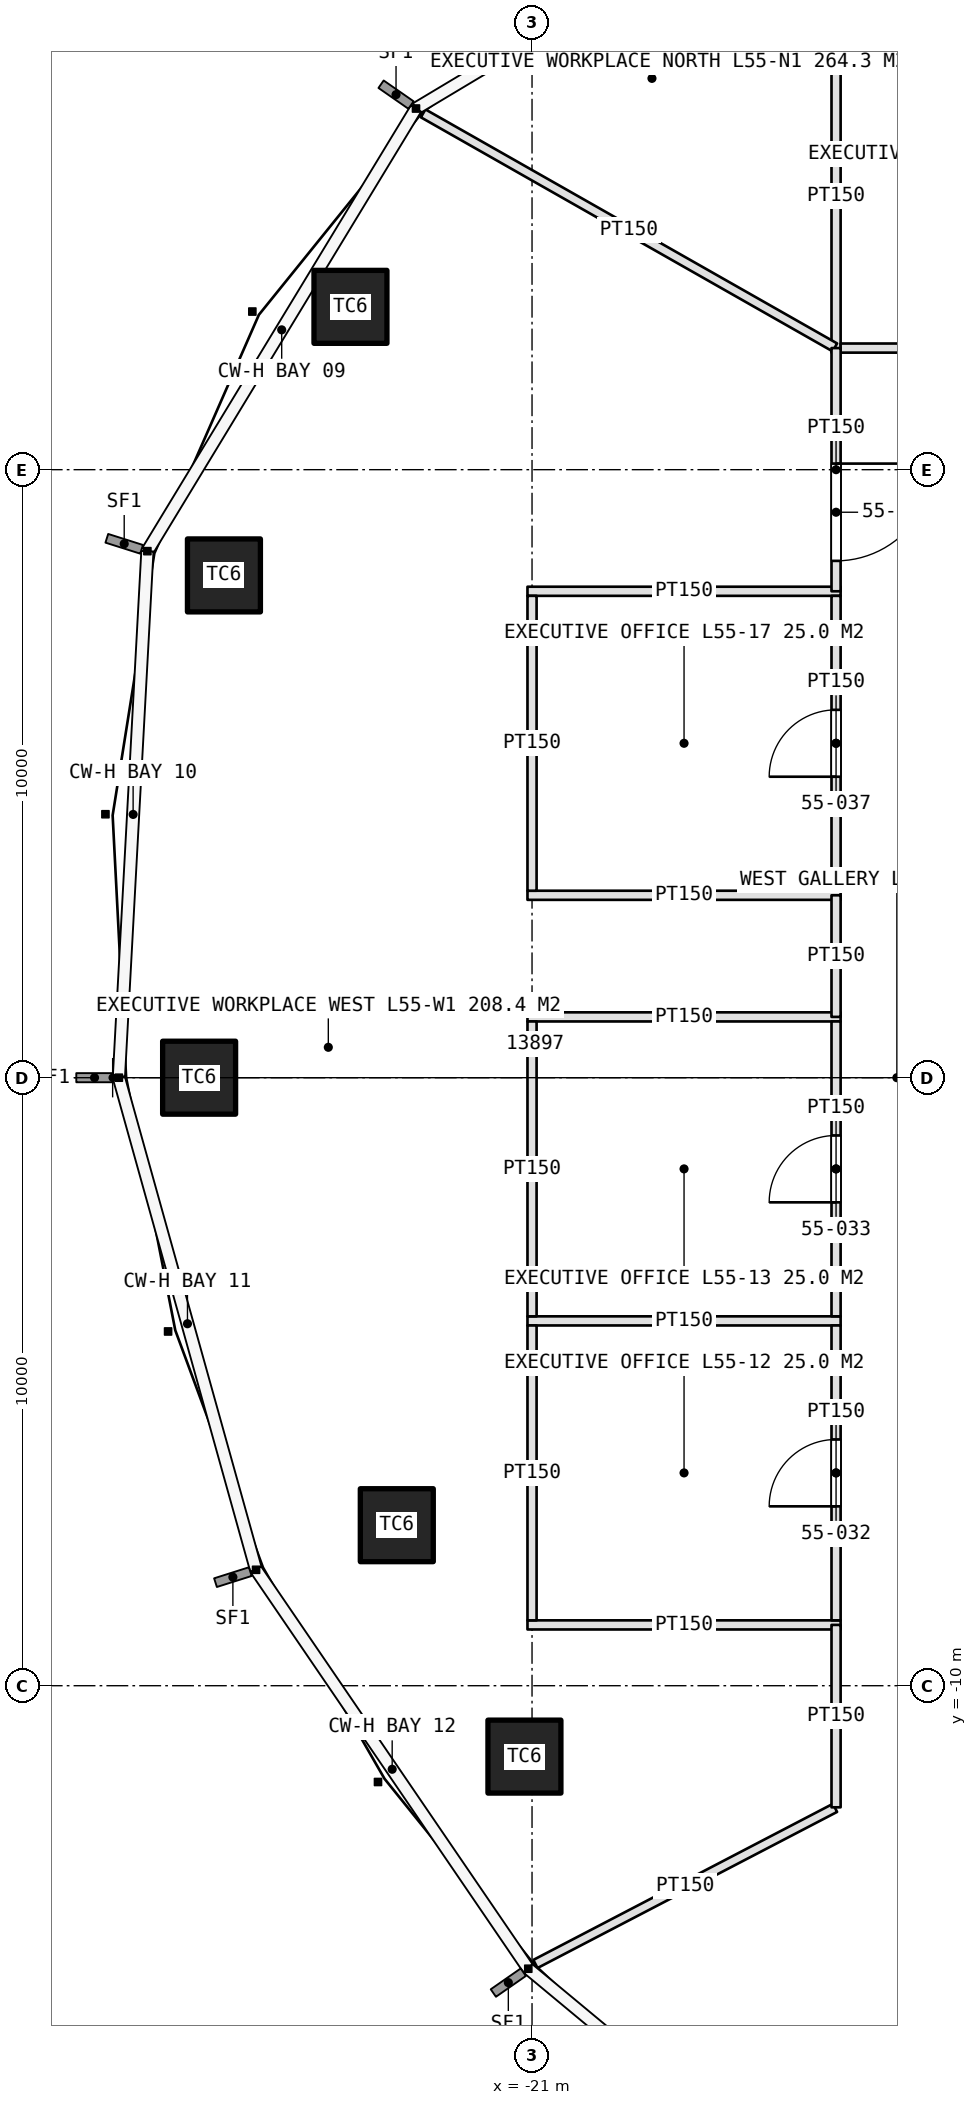
"""IFC4 building model, lengths in metres.
Left out: names, types, materials, properties, quantities, classifications, styles, units other than length and angle.
Written with IfcOpenShell. Run it as: python <this file> out.ifc"""

import sys

from ifc_helpers import new_model, si_unit, direction, frame, frame_2d, origin, origin_2d, place, context, subcontext, project, spatial, rectangle, extrude, element, fill, save


model = new_model("IFC4")
c1 = context("Model", 3, precision=1e-05, world=origin(), true_north=direction((0.0, 1.0)))
c2 = subcontext(c1, "Body", "Model", "MODEL_VIEW")
j1 = project(units=[si_unit("LENGTHUNIT", "METRE"), si_unit("PLANEANGLEUNIT", "RADIAN")], contexts=[c1])
p1 = place(None, origin())
s1 = spatial("IfcSite", under=j1, at=p1, CompositionType="ELEMENT")
p2 = place(p1, origin())
s2 = spatial("IfcBuilding", under=s1, at=p2, CompositionType="ELEMENT")
p3 = place(p2, frame((0.0, 0.0, 249.4)))
s3 = spatial("IfcBuildingStorey", under=s2, at=p3, CompositionType="ELEMENT", Elevation=249.4)
for number, where, z_axis, x_axis in (
    (1, (-23.986, 12.678, 0.0), (0.0, 0.0, 1.0), (1.0, 0.0, 0.0)),
    (2, (-26.067, 8.261, 0.0), (0.0, 0.0, 1.0), (1.0, 0.0, 0.0)),
    (3, (-26.475, 0.0, 0.0), (0.0, 0.0, 1.0), (1.0, 0.0, 0.0)),
    (4, (-23.224, -7.36, 0.0), (0.0, 0.0, 1.0), (1.0, 0.0, 0.0)),
    (5, (-21.125, -11.166, 0.0), (0.0, 0.0, 1.0), (1.0, 0.0, 0.0)),
):
    element("IfcColumn", number, at=place(p3, frame(where, z_axis=z_axis, x_axis=x_axis)), inside=s3, PredefinedType="COLUMN", context=c2, shape_type="SweptSolid", body=[
        extrude(rectangle(XDim=1.2, YDim=1.2, at=origin_2d()), origin(), (0.0, 0.0, 1.0), 4.2),
    ])
p4 = place(p3, frame((-16.0, 11.925, 0.0), z_axis=(0.0, 0.0, 1.0), x_axis=(0.0, 1.0, 0.0)))
e6 = element("IfcWall", 6, at=p4, inside=s3, PredefinedType="PARTITIONING", context=c2, shape_type="SweptSolid", body=[
    extrude(rectangle(XDim=5.15, YDim=0.15, at=frame_2d((2.575, 0.0))), origin(), (0.0, 0.0, 1.0), 3.0),
])
p5 = place(p3, frame((-15.925, 12.0, 0.0), z_axis=(0.0, 0.0, 1.0), x_axis=(1.0, 0.0, 0.0)))
e7 = element("IfcWall", 7, at=p5, inside=s3, PredefinedType="PARTITIONING", context=c2, shape_type="SweptSolid", body=[
    extrude(rectangle(XDim=4.85, YDim=0.15, at=frame_2d((2.425, 0.0))), origin(), (0.0, 0.0, 1.0), 3.0),
])
p6 = place(p5, frame((1.875, 0.0, 0.0)))
e8 = element("IfcOpeningElement", 8, at=p6, cuts=e7, PredefinedType="OPENING", context=c2, shape_type="SweptSolid", body=[
    extrude(rectangle(XDim=1.1, YDim=2.3, at=frame_2d((0.55, 1.15))), frame((0.0, 0.085, 0.0), z_axis=(0.0, -1.0, 0.0), x_axis=(1.0, 0.0, 0.0)), (0.0, 0.0, 1.0), 0.17),
])
for number, where, z_axis, x_axis in (
    (9, (-15.925, -9.0, 0.0), (0.0, 0.0, 1.0), (-1.0, 0.0, 0.0)),
    (10, (-15.925, -4.0, 0.0), (0.0, 0.0, 1.0), (-1.0, 0.0, 0.0)),
    (11, (-15.925, 1.0, 0.0), (0.0, 0.0, 1.0), (-1.0, 0.0, 0.0)),
):
    element("IfcWall", number, at=place(p3, frame(where, z_axis=z_axis, x_axis=x_axis)), inside=s3, PredefinedType="PARTITIONING", context=c2, shape_type="SweptSolid", body=[
        extrude(rectangle(XDim=5.15, YDim=0.15, at=frame_2d((2.575, 0.0))), origin(), (0.0, 0.0, 1.0), 3.0),
    ])
p7 = place(p3, frame((-16.0, -8.925, 0.0), z_axis=(0.0, 0.0, 1.0), x_axis=(0.0, 1.0, 0.0)))
e12 = element("IfcWall", 12, at=p7, inside=s3, PredefinedType="PARTITIONING", context=c2, shape_type="SweptSolid", body=[
    extrude(rectangle(XDim=4.85, YDim=0.15, at=frame_2d((2.425, 0.0))), origin(), (0.0, 0.0, 1.0), 3.0),
])
p8 = place(p7, frame((1.875, 0.0, 0.0)))
e13 = element("IfcOpeningElement", 13, at=p8, cuts=e12, PredefinedType="OPENING", context=c2, shape_type="SweptSolid", body=[
    extrude(rectangle(XDim=1.1, YDim=2.3, at=frame_2d((0.55, 1.15))), frame((0.0, 0.085, 0.0), z_axis=(0.0, -1.0, 0.0), x_axis=(1.0, 0.0, 0.0)), (0.0, 0.0, 1.0), 0.17),
])
p9 = place(p3, frame((-21.0, -8.925, 0.0), z_axis=(0.0, 0.0, 1.0), x_axis=(0.0, 1.0, 0.0)))
e14 = element("IfcWall", 14, at=p9, inside=s3, PredefinedType="PARTITIONING", context=c2, shape_type="SweptSolid", body=[
    extrude(rectangle(XDim=4.85, YDim=0.15, at=frame_2d((2.425, 0.0))), origin(), (0.0, 0.0, 1.0), 3.0),
])
p10 = place(p3, frame((-16.0, -3.925, 0.0), z_axis=(0.0, 0.0, 1.0), x_axis=(0.0, 1.0, 0.0)))
e15 = element("IfcWall", 15, at=p10, inside=s3, PredefinedType="PARTITIONING", context=c2, shape_type="SweptSolid", body=[
    extrude(rectangle(XDim=4.85, YDim=0.15, at=frame_2d((2.425, 0.0))), origin(), (0.0, 0.0, 1.0), 3.0),
])
p11 = place(p10, frame((1.875, 0.0, 0.0)))
e16 = element("IfcOpeningElement", 16, at=p11, cuts=e15, PredefinedType="OPENING", context=c2, shape_type="SweptSolid", body=[
    extrude(rectangle(XDim=1.1, YDim=2.3, at=frame_2d((0.55, 1.15))), frame((0.0, 0.085, 0.0), z_axis=(0.0, -1.0, 0.0), x_axis=(1.0, 0.0, 0.0)), (0.0, 0.0, 1.0), 0.17),
])
p12 = place(p3, frame((-21.0, -3.925, 0.0), z_axis=(0.0, 0.0, 1.0), x_axis=(0.0, 1.0, 0.0)))
e17 = element("IfcWall", 17, at=p12, inside=s3, PredefinedType="PARTITIONING", context=c2, shape_type="SweptSolid", body=[
    extrude(rectangle(XDim=4.85, YDim=0.15, at=frame_2d((2.425, 0.0))), origin(), (0.0, 0.0, 1.0), 3.0),
])
for number, where, z_axis, x_axis in (
    (18, (-15.925, 3.0, 0.0), (0.0, 0.0, 1.0), (-1.0, 0.0, 0.0)),
    (19, (-15.925, 8.0, 0.0), (0.0, 0.0, 1.0), (-1.0, 0.0, 0.0)),
):
    element("IfcWall", number, at=place(p3, frame(where, z_axis=z_axis, x_axis=x_axis)), inside=s3, PredefinedType="PARTITIONING", context=c2, shape_type="SweptSolid", body=[
        extrude(rectangle(XDim=5.15, YDim=0.15, at=frame_2d((2.575, 0.0))), origin(), (0.0, 0.0, 1.0), 3.0),
    ])
p13 = place(p3, frame((-16.0, 3.075, 0.0), z_axis=(0.0, 0.0, 1.0), x_axis=(0.0, 1.0, 0.0)))
e20 = element("IfcWall", 20, at=p13, inside=s3, PredefinedType="PARTITIONING", context=c2, shape_type="SweptSolid", body=[
    extrude(rectangle(XDim=4.85, YDim=0.15, at=frame_2d((2.425, 0.0))), origin(), (0.0, 0.0, 1.0), 3.0),
])
p14 = place(p13, frame((1.875, 0.0, 0.0)))
e21 = element("IfcOpeningElement", 21, at=p14, cuts=e20, PredefinedType="OPENING", context=c2, shape_type="SweptSolid", body=[
    extrude(rectangle(XDim=1.1, YDim=2.3, at=frame_2d((0.55, 1.15))), frame((0.0, 0.085, 0.0), z_axis=(0.0, -1.0, 0.0), x_axis=(1.0, 0.0, 0.0)), (0.0, 0.0, 1.0), 0.17),
])
p15 = place(p3, frame((-21.0, 3.075, 0.0), z_axis=(0.0, 0.0, 1.0), x_axis=(0.0, 1.0, 0.0)))
e22 = element("IfcWall", 22, at=p15, inside=s3, PredefinedType="PARTITIONING", context=c2, shape_type="SweptSolid", body=[
    extrude(rectangle(XDim=4.85, YDim=0.15, at=frame_2d((2.425, 0.0))), origin(), (0.0, 0.0, 1.0), 3.0),
])
p16 = place(p3, frame((-16.018, -12.009, 0.0), z_axis=(0.0, 0.0, 1.0), x_axis=(-0.886831549241, -0.462092851351, 0.0)))
e23 = element("IfcWall", 23, at=p16, inside=s3, PredefinedType="PARTITIONING", context=c2, shape_type="SweptSolid", body=[
    extrude(rectangle(XDim=5.555, YDim=0.15, at=frame_2d((2.778, 0.0))), origin(), (0.0, 0.0, 1.0), 3.0),
])
p17 = place(p3, frame((-16.02, 12.011, 0.0), z_axis=(0.0, 0.0, 1.0), x_axis=(-0.869354026591, 0.494189818238, 0.0)))
e24 = element("IfcWall", 24, at=p17, inside=s3, PredefinedType="PARTITIONING", context=c2, shape_type="SweptSolid", body=[
    extrude(rectangle(XDim=7.788, YDim=0.15, at=frame_2d((3.894, 0.0))), origin(), (0.0, 0.0, 1.0), 3.0),
])
p18 = place(p3, frame((-16.0, -9.0, 0.0), z_axis=(0.0, 0.0, 1.0), x_axis=(0.0, -1.0, 0.0)))
e25 = element("IfcWall", 25, at=p18, inside=s3, PredefinedType="PARTITIONING", context=c2, shape_type="SweptSolid", body=[
    extrude(rectangle(XDim=3.0, YDim=0.15, at=frame_2d((1.5, 0.0))), origin(), (0.0, 0.0, 1.0), 3.0),
])
p19 = place(p3, frame((-16.0, 3.0, 0.0), z_axis=(0.0, 0.0, 1.0), x_axis=(0.0, -1.0, 0.0)))
e26 = element("IfcWall", 26, at=p19, inside=s3, PredefinedType="PARTITIONING", context=c2, shape_type="SweptSolid", body=[
    extrude(rectangle(XDim=2.0, YDim=0.15, at=frame_2d((1.0, 0.0))), origin(), (0.0, 0.0, 1.0), 3.0),
])
p20 = place(p3, frame((-16.0, 12.0, 0.0), z_axis=(0.0, 0.0, 1.0), x_axis=(0.0, -1.0, 0.0)))
e27 = element("IfcWall", 27, at=p20, inside=s3, PredefinedType="PARTITIONING", context=c2, shape_type="SweptSolid", body=[
    extrude(rectangle(XDim=4.0, YDim=0.15, at=frame_2d((2.0, 0.0))), origin(), (0.0, 0.0, 1.0), 3.0),
])
p21 = place(p20, frame((1.9, 0.0, 0.0)))
e28 = element("IfcOpeningElement", 28, at=p21, cuts=e27, PredefinedType="OPENING", context=c2, shape_type="SweptSolid", body=[
    extrude(rectangle(XDim=1.6, YDim=2.4, at=frame_2d((0.8, 1.2))), frame((0.0, 0.085, 0.0), z_axis=(0.0, -1.0, 0.0), x_axis=(1.0, 0.0, 0.0)), (0.0, 0.0, 1.0), 0.17),
])
p22 = place(p8, origin())
e29 = element("IfcDoor", 29, at=p22, inside=s3, OperationType="SINGLE_SWING_LEFT", PredefinedType="DOOR", context=c2, shape_type="SweptSolid", body=[
    extrude(rectangle(XDim=1.1, YDim=2.3, at=frame_2d((0.55, 1.15))), frame((0.0, 0.025, 0.0), z_axis=(0.0, -1.0, 0.0), x_axis=(1.0, 0.0, 0.0)), (0.0, 0.0, 1.0), 0.05),
])
fill(e13, e29)
p23 = place(p11, origin())
e30 = element("IfcDoor", 30, at=p23, inside=s3, OperationType="SINGLE_SWING_LEFT", PredefinedType="DOOR", context=c2, shape_type="SweptSolid", body=[
    extrude(rectangle(XDim=1.1, YDim=2.3, at=frame_2d((0.55, 1.15))), frame((0.0, 0.025, 0.0), z_axis=(0.0, -1.0, 0.0), x_axis=(1.0, 0.0, 0.0)), (0.0, 0.0, 1.0), 0.05),
])
fill(e16, e30)
p24 = place(p14, origin())
e31 = element("IfcDoor", 31, at=p24, inside=s3, OperationType="SINGLE_SWING_LEFT", PredefinedType="DOOR", context=c2, shape_type="SweptSolid", body=[
    extrude(rectangle(XDim=1.1, YDim=2.3, at=frame_2d((0.55, 1.15))), frame((0.0, 0.025, 0.0), z_axis=(0.0, -1.0, 0.0), x_axis=(1.0, 0.0, 0.0)), (0.0, 0.0, 1.0), 0.05),
])
fill(e21, e31)
p25 = place(p21, origin())
e32 = element("IfcDoor", 32, at=p25, inside=s3, OperationType="DOUBLE_DOOR_SINGLE_SWING", PredefinedType="DOOR", context=c2, shape_type="SweptSolid", body=[
    extrude(rectangle(XDim=1.6, YDim=2.4, at=frame_2d((0.8, 1.2))), frame((0.0, 0.025, 0.0), z_axis=(0.0, -1.0, 0.0), x_axis=(1.0, 0.0, 0.0)), (0.0, 0.0, 1.0), 0.05),
])
fill(e28, e32)
save(model, sys.argv[1])
